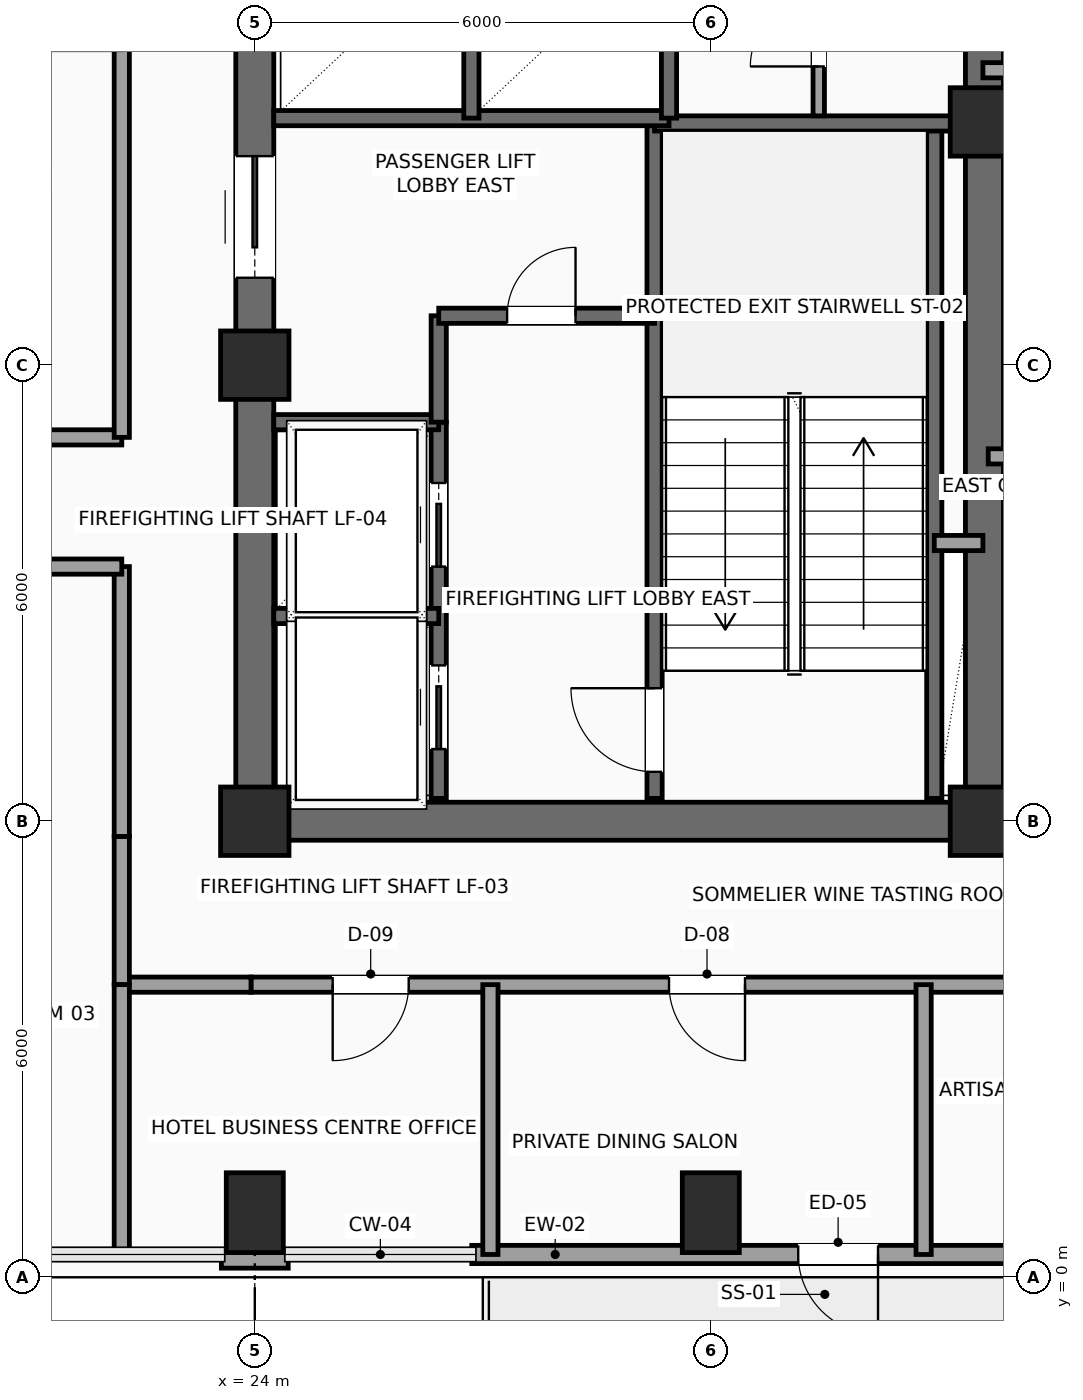
"""IFC4 building model, lengths in metres.
Left out: names, types, materials, properties, quantities, classifications, styles, units other than length and angle.
Written with IfcOpenShell. Run it as: python <this file> out.ifc"""

import sys

from ifc_helpers import new_model, si_unit, direction, frame, frame_2d, origin, origin_2d, place, context, subcontext, project, spatial, rectangle, extrude, element, fill, save


model = new_model("IFC4")
c1 = context("Model", 3, precision=1e-05, world=origin(), true_north=direction((0.0, 1.0)))
c2 = subcontext(c1, "Body", "Model", "MODEL_VIEW")
j1 = project(units=[si_unit("LENGTHUNIT", "METRE"), si_unit("PLANEANGLEUNIT", "RADIAN")], contexts=[c1])
p1 = place(None, origin())
s1 = spatial("IfcSite", under=j1, at=p1, CompositionType="ELEMENT")
p2 = place(p1, origin())
s2 = spatial("IfcBuilding", under=s1, at=p2, CompositionType="ELEMENT")
p3 = place(p2, frame((0.0, 0.0, 169.2)))
s3 = spatial("IfcBuildingStorey", under=s2, at=p3, CompositionType="ELEMENT", Elevation=169.2)
for number, where, z_axis, x_axis in (
    (1, (24.0, 6.0, 0.0), (0.0, 0.0, 1.0), (1.0, 0.0, 0.0)),
    (2, (24.0, 12.0, 0.0), (0.0, 0.0, 1.0), (1.0, 0.0, 0.0)),
    (3, (33.6, 6.0, 0.0), (0.0, 0.0, 1.0), (1.0, 0.0, 0.0)),
    (4, (33.6, 15.2, 0.0), (0.0, 0.0, 1.0), (1.0, 0.0, 0.0)),
):
    element("IfcColumn", number, at=place(p3, frame(where, z_axis=z_axis, x_axis=x_axis)), inside=s3, PredefinedType="COLUMN", context=c2, shape_type="SweptSolid", body=[
        extrude(rectangle(XDim=0.9, YDim=0.9, at=origin_2d()), origin(), (0.0, 0.0, 1.0), 3.75),
    ])
for number, where, z_axis, x_axis in (
    (5, (24.0, 0.85, 0.0), (0.0, 0.0, 1.0), (1.0, 0.0, 0.0)),
    (6, (30.0, 0.85, 0.0), (0.0, 0.0, 1.0), (1.0, 0.0, 0.0)),
):
    element("IfcColumn", number, at=place(p3, frame(where, z_axis=z_axis, x_axis=x_axis)), inside=s3, PredefinedType="COLUMN", context=c2, shape_type="SweptSolid", body=[
        extrude(rectangle(XDim=0.75, YDim=1.05, at=origin_2d()), origin(), (0.0, 0.0, 1.0), 3.75),
    ])
p4 = place(p3, frame((36.145, 0.3, 0.0), z_axis=(0.0, 0.0, 1.0), x_axis=(-1.0, 0.0, 0.0)))
e7 = element("IfcWall", 7, at=p4, inside=s3, PredefinedType="SOLIDWALL", context=c2, shape_type="SweptSolid", body=[
    extrude(rectangle(XDim=9.29, YDim=0.24, at=frame_2d((4.645, 0.0))), origin(), (0.0, 0.0, 1.0), 3.54),
])
p5 = place(p4, frame((3.945, 0.0, 0.0)))
e8 = element("IfcOpeningElement", 8, at=p5, cuts=e7, PredefinedType="OPENING", context=c2, shape_type="SweptSolid", body=[
    extrude(rectangle(XDim=1.05, YDim=2.2, at=frame_2d((0.525, 1.1))), frame((0.0, 0.13, 0.0), z_axis=(0.0, -1.0, 0.0), x_axis=(1.0, 0.0, 0.0)), (0.0, 0.0, 1.0), 0.26),
])
p6 = place(p3, frame((24.44, 0.24, 0.0), z_axis=(0.0, 0.0, 1.0), x_axis=(-1.0, 0.0, 0.0)))
e9 = element("IfcWall", 9, at=p6, inside=s3, PredefinedType="SOLIDWALL", context=c2, shape_type="SweptSolid", body=[
    extrude(rectangle(XDim=0.88, YDim=0.24, at=frame_2d((0.44, 0.0))), origin(), (0.0, 0.0, 1.0), 3.54),
])
p7 = place(p3, frame((24.0, 6.0, 0.0), z_axis=(0.0, 0.0, 1.0), x_axis=(1.0, 0.0, 0.0)))
e10 = element("IfcWall", 10, at=p7, inside=s3, PredefinedType="SHEAR", context=c2, shape_type="SweptSolid", body=[
    extrude(rectangle(XDim=9.6, YDim=0.5, at=frame_2d((4.8, 0.0))), origin(), (0.0, 0.0, 1.0), 3.54),
])
p8 = place(p3, frame((24.0, 6.0, 0.0), z_axis=(0.0, 0.0, 1.0), x_axis=(0.0, 1.0, 0.0)))
e11 = element("IfcWall", 11, at=p8, inside=s3, PredefinedType="SHEAR", context=c2, shape_type="SweptSolid", body=[
    extrude(rectangle(XDim=12.0, YDim=0.5, at=frame_2d((6.0, 0.0))), origin(), (0.0, 0.0, 1.0), 3.54),
])
p9 = place(p8, frame((7.15, 0.0, 0.0)))
e12 = element("IfcOpeningElement", 12, at=p9, cuts=e11, PredefinedType="OPENING", context=c2, shape_type="SweptSolid", body=[
    extrude(rectangle(XDim=1.6, YDim=2.3, at=frame_2d((0.8, 1.15))), frame((0.0, 0.26, 0.0), z_axis=(0.0, -1.0, 0.0), x_axis=(1.0, 0.0, 0.0)), (0.0, 0.0, 1.0), 0.52),
])
p10 = place(p3, frame((33.6, 6.0, 0.0), z_axis=(0.0, 0.0, 1.0), x_axis=(0.0, 1.0, 0.0)))
e13 = element("IfcWall", 13, at=p10, inside=s3, PredefinedType="SHEAR", context=c2, shape_type="SweptSolid", body=[
    extrude(rectangle(XDim=12.0, YDim=0.5, at=frame_2d((6.0, 0.0))), origin(), (0.0, 0.0, 1.0), 3.54),
])
p11 = place(p10, frame((10.15, 0.0, 0.0)))
e14 = element("IfcOpeningElement", 14, at=p11, cuts=e13, PredefinedType="OPENING", context=c2, shape_type="SweptSolid", body=[
    extrude(rectangle(XDim=0.9, YDim=2.15, at=frame_2d((0.45, 1.075))), frame((0.0, 0.26, 0.0), z_axis=(0.0, -1.0, 0.0), x_axis=(1.0, 0.0, 0.0)), (0.0, 0.0, 1.0), 0.52),
])
p12 = place(p3, frame((29.26, 6.3, 0.0), z_axis=(0.0, 0.0, 1.0), x_axis=(0.0, 1.0, 0.0)))
e15 = element("IfcWall", 15, at=p12, inside=s3, PredefinedType="SHEAR", context=c2, shape_type="SweptSolid", body=[
    extrude(rectangle(XDim=8.88, YDim=0.2, at=frame_2d((4.44, 0.0))), origin(), (0.0, 0.0, 1.0), 3.54),
])
p13 = place(p12, frame((0.35, 0.0, 0.0)))
e16 = element("IfcOpeningElement", 16, at=p13, cuts=e15, PredefinedType="OPENING", context=c2, shape_type="SweptSolid", body=[
    extrude(rectangle(XDim=1.1, YDim=2.2, at=frame_2d((0.55, 1.1))), frame((0.0, 0.11, 0.0), z_axis=(0.0, -1.0, 0.0), x_axis=(1.0, 0.0, 0.0)), (0.0, 0.0, 1.0), 0.22),
])
p14 = place(p3, frame((32.94, 6.3, 0.0), z_axis=(0.0, 0.0, 1.0), x_axis=(0.0, 1.0, 0.0)))
e17 = element("IfcWall", 17, at=p14, inside=s3, PredefinedType="SHEAR", context=c2, shape_type="SweptSolid", body=[
    extrude(rectangle(XDim=8.88, YDim=0.2, at=frame_2d((4.44, 0.0))), origin(), (0.0, 0.0, 1.0), 3.54),
])
p15 = place(p3, frame((29.26, 15.18, 0.0), z_axis=(0.0, 0.0, 1.0), x_axis=(1.0, 0.0, 0.0)))
e18 = element("IfcWall", 18, at=p15, inside=s3, PredefinedType="SHEAR", context=c2, shape_type="SweptSolid", body=[
    extrude(rectangle(XDim=4.04, YDim=0.2, at=frame_2d((2.02, 0.0))), origin(), (0.0, 0.0, 1.0), 3.54),
])
p16 = place(p3, frame((26.42, 6.3, 0.0), z_axis=(0.0, 0.0, 1.0), x_axis=(0.0, 1.0, 0.0)))
e19 = element("IfcWall", 19, at=p16, inside=s3, PredefinedType="SHEAR", context=c2, shape_type="SweptSolid", body=[
    extrude(rectangle(XDim=4.95, YDim=0.2, at=frame_2d((2.475, 0.0))), origin(), (0.0, 0.0, 1.0), 3.54),
])
p17 = place(p16, frame((0.65, 0.0, 0.0)))
e20 = element("IfcOpeningElement", 20, at=p17, cuts=e19, PredefinedType="OPENING", context=c2, shape_type="SweptSolid", body=[
    extrude(rectangle(XDim=1.1, YDim=2.2, at=frame_2d((0.55, 1.1))), frame((0.0, 0.11, 0.0), z_axis=(0.0, -1.0, 0.0), x_axis=(1.0, 0.0, 0.0)), (0.0, 0.0, 1.0), 0.22),
])
p18 = place(p16, frame((3.05, 0.0, 0.0)))
e21 = element("IfcOpeningElement", 21, at=p18, cuts=e19, PredefinedType="OPENING", context=c2, shape_type="SweptSolid", body=[
    extrude(rectangle(XDim=1.1, YDim=2.2, at=frame_2d((0.55, 1.1))), frame((0.0, 0.11, 0.0), z_axis=(0.0, -1.0, 0.0), x_axis=(1.0, 0.0, 0.0)), (0.0, 0.0, 1.0), 0.22),
])
for number, where, z_axis, x_axis in (
    (22, (24.25, 8.7, 0.0), (0.0, 0.0, 1.0), (1.0, 0.0, 0.0)),
    (23, (24.25, 11.25, 0.0), (0.0, 0.0, 1.0), (1.0, 0.0, 0.0)),
):
    element("IfcWall", number, at=place(p3, frame(where, z_axis=z_axis, x_axis=x_axis)), inside=s3, PredefinedType="SHEAR", context=c2, shape_type="SweptSolid", body=[
        extrude(rectangle(XDim=2.17, YDim=0.2, at=frame_2d((1.085, 0.0))), origin(), (0.0, 0.0, 1.0), 3.54),
    ])
p19 = place(p3, frame((26.42, 11.25, 0.0), z_axis=(0.0, 0.0, 1.0), x_axis=(0.0, 1.0, 0.0)))
e24 = element("IfcWall", 24, at=p19, inside=s3, PredefinedType="SHEAR", context=c2, shape_type="SweptSolid", body=[
    extrude(rectangle(XDim=1.4, YDim=0.2, at=frame_2d((0.7, 0.0))), origin(), (0.0, 0.0, 1.0), 3.54),
])
p20 = place(p3, frame((26.42, 12.65, 0.0), z_axis=(0.0, 0.0, 1.0), x_axis=(1.0, 0.0, 0.0)))
e25 = element("IfcWall", 25, at=p20, inside=s3, PredefinedType="SHEAR", context=c2, shape_type="SweptSolid", body=[
    extrude(rectangle(XDim=2.84, YDim=0.2, at=frame_2d((1.42, 0.0))), origin(), (0.0, 0.0, 1.0), 3.54),
])
p21 = place(p20, frame((0.9, 0.0, 0.0)))
e26 = element("IfcOpeningElement", 26, at=p21, cuts=e25, PredefinedType="OPENING", context=c2, shape_type="SweptSolid", body=[
    extrude(rectangle(XDim=0.9, YDim=2.15, at=frame_2d((0.45, 1.075))), frame((0.0, 0.11, 0.0), z_axis=(0.0, -1.0, 0.0), x_axis=(1.0, 0.0, 0.0)), (0.0, 0.0, 1.0), 0.22),
])
p22 = place(p3, frame((32.94, 9.66, 0.0), z_axis=(0.0, 0.0, 1.0), x_axis=(1.0, 0.0, 0.0)))
e27 = element("IfcWall", 27, at=p22, inside=s3, PredefinedType="SOLIDWALL", context=c2, shape_type="SweptSolid", body=[
    extrude(rectangle(XDim=0.64, YDim=0.2, at=frame_2d((0.32, 0.0))), origin(), (0.0, 0.0, 1.0), 3.54),
])
p23 = place(p3, frame((24.25, 15.25, 0.0), z_axis=(0.0, 0.0, 1.0), x_axis=(1.0, 0.0, 0.0)))
e28 = element("IfcWall", 28, at=p23, inside=s3, PredefinedType="SHEAR", context=c2, shape_type="SweptSolid", body=[
    extrude(rectangle(XDim=5.2, YDim=0.2, at=frame_2d((2.6, 0.0))), origin(), (0.0, 0.0, 1.0), 3.54),
])
p24 = place(p3, frame((26.85, 15.25, 0.0), z_axis=(0.0, 0.0, 1.0), x_axis=(0.0, 1.0, 0.0)))
e29 = element("IfcWall", 29, at=p24, inside=s3, PredefinedType="SHEAR", context=c2, shape_type="SweptSolid", body=[
    extrude(rectangle(XDim=2.4, YDim=0.2, at=frame_2d((1.2, 0.0))), origin(), (0.0, 0.0, 1.0), 3.54),
])
p25 = place(p3, frame((29.45, 15.25, 0.0), z_axis=(0.0, 0.0, 1.0), x_axis=(0.0, 1.0, 0.0)))
e30 = element("IfcWall", 30, at=p25, inside=s3, PredefinedType="SHEAR", context=c2, shape_type="SweptSolid", body=[
    extrude(rectangle(XDim=2.45, YDim=0.2, at=frame_2d((1.225, 0.0))), origin(), (0.0, 0.0, 1.0), 3.54),
])
p26 = place(p3, frame((31.42, 15.28, 0.0), z_axis=(0.0, 0.0, 1.0), x_axis=(0.0, 1.0, 0.0)))
e31 = element("IfcWall", 31, at=p26, inside=s3, PredefinedType="PARTITIONING", context=c2, shape_type="SweptSolid", body=[
    extrude(rectangle(XDim=2.42, YDim=0.15, at=frame_2d((1.21, 0.0))), origin(), (0.0, 0.0, 1.0), 3.54),
])
p27 = place(p26, frame((0.65, 0.0, 0.0)))
e32 = element("IfcOpeningElement", 32, at=p27, cuts=e31, PredefinedType="OPENING", context=c2, shape_type="SweptSolid", body=[
    extrude(rectangle(XDim=0.9, YDim=2.15, at=frame_2d((0.45, 1.075))), frame((0.0, 0.085, 0.0), z_axis=(0.0, -1.0, 0.0), x_axis=(1.0, 0.0, 0.0)), (0.0, 0.0, 1.0), 0.17),
])
p28 = place(p3, frame((36.35, 15.88, 0.0), z_axis=(0.0, 0.0, 1.0), x_axis=(-1.0, 0.0, 0.0)))
e33 = element("IfcWall", 33, at=p28, inside=s3, PredefinedType="PARTITIONING", context=c2, shape_type="SweptSolid", body=[
    extrude(rectangle(XDim=2.77, YDim=0.2, at=frame_2d((1.385, 0.0))), origin(), (0.0, 0.0, 1.0), 3.54),
])
p29 = place(p3, frame((36.35, 3.85, 0.0), z_axis=(0.0, 0.0, 1.0), x_axis=(-1.0, 0.0, 0.0)))
e34 = element("IfcWall", 34, at=p29, inside=s3, PredefinedType="PARTITIONING", context=c2, shape_type="SweptSolid", body=[
    extrude(rectangle(XDim=12.4, YDim=0.2, at=frame_2d((6.2, 0.0))), origin(), (0.0, 0.0, 1.0), 3.54),
])
p30 = place(p29, frame((10.325, 0.0, 0.0)))
e35 = element("IfcOpeningElement", 35, at=p30, cuts=e34, PredefinedType="OPENING", context=c2, shape_type="SweptSolid", body=[
    extrude(rectangle(XDim=1.0, YDim=2.2, at=frame_2d((0.5, 1.1))), frame((0.0, 0.11, 0.0), z_axis=(0.0, -1.0, 0.0), x_axis=(1.0, 0.0, 0.0)), (0.0, 0.0, 1.0), 0.22),
])
p31 = place(p29, frame((5.9, 0.0, 0.0)))
e36 = element("IfcOpeningElement", 36, at=p31, cuts=e34, PredefinedType="OPENING", context=c2, shape_type="SweptSolid", body=[
    extrude(rectangle(XDim=1.0, YDim=2.2, at=frame_2d((0.5, 1.1))), frame((0.0, 0.11, 0.0), z_axis=(0.0, -1.0, 0.0), x_axis=(1.0, 0.0, 0.0)), (0.0, 0.0, 1.0), 0.22),
])
p32 = place(p3, frame((23.95, 3.85, 0.0), z_axis=(0.0, 0.0, 1.0), x_axis=(-1.0, 0.0, 0.0)))
e37 = element("IfcWall", 37, at=p32, inside=s3, PredefinedType="PARTITIONING", context=c2, shape_type="SweptSolid", body=[
    extrude(rectangle(XDim=1.7, YDim=0.2, at=frame_2d((0.85, 0.0))), origin(), (0.0, 0.0, 1.0), 3.54),
])
p33 = place(p3, frame((22.25, 3.85, 0.0), z_axis=(0.0, 0.0, 1.0), x_axis=(0.0, 1.0, 0.0)))
e38 = element("IfcWall", 38, at=p33, inside=s3, PredefinedType="PARTITIONING", context=c2, shape_type="SweptSolid", body=[
    extrude(rectangle(XDim=1.95, YDim=0.2, at=frame_2d((0.975, 0.0))), origin(), (0.0, 0.0, 1.0), 3.54),
])
p34 = place(p3, frame((22.25, 5.8, 0.0), z_axis=(0.0, 0.0, 1.0), x_axis=(0.0, 1.0, 0.0)))
e39 = element("IfcWall", 39, at=p34, inside=s3, PredefinedType="PARTITIONING", context=c2, shape_type="SweptSolid", body=[
    extrude(rectangle(XDim=3.55, YDim=0.2, at=frame_2d((1.775, 0.0))), origin(), (0.0, 0.0, 1.0), 3.54),
])
p35 = place(p3, frame((22.25, 9.35, 0.0), z_axis=(0.0, 0.0, 1.0), x_axis=(-1.0, 0.0, 0.0)))
e40 = element("IfcWall", 40, at=p35, inside=s3, PredefinedType="PARTITIONING", context=c2, shape_type="SweptSolid", body=[
    extrude(rectangle(XDim=15.85, YDim=0.2, at=frame_2d((7.925, 0.0))), origin(), (0.0, 0.0, 1.0), 3.54),
])
p36 = place(p35, frame((14.19, 0.0, 0.0)))
e41 = element("IfcOpeningElement", 41, at=p36, cuts=e40, PredefinedType="OPENING", context=c2, shape_type="SweptSolid", body=[
    extrude(rectangle(XDim=1.0, YDim=2.2, at=frame_2d((0.5, 1.1))), frame((0.0, 0.11, 0.0), z_axis=(0.0, -1.0, 0.0), x_axis=(1.0, 0.0, 0.0)), (0.0, 0.0, 1.0), 0.22),
])
p37 = place(p35, frame((8.265, 0.0, 0.0)))
e42 = element("IfcOpeningElement", 42, at=p37, cuts=e40, PredefinedType="OPENING", context=c2, shape_type="SweptSolid", body=[
    extrude(rectangle(XDim=1.0, YDim=2.2, at=frame_2d((0.5, 1.1))), frame((0.0, 0.11, 0.0), z_axis=(0.0, -1.0, 0.0), x_axis=(1.0, 0.0, 0.0)), (0.0, 0.0, 1.0), 0.22),
])
p38 = place(p35, frame((1.54, 0.0, 0.0)))
e43 = element("IfcOpeningElement", 43, at=p38, cuts=e40, PredefinedType="OPENING", context=c2, shape_type="SweptSolid", body=[
    extrude(rectangle(XDim=1.0, YDim=2.2, at=frame_2d((0.5, 1.1))), frame((0.0, 0.11, 0.0), z_axis=(0.0, -1.0, 0.0), x_axis=(1.0, 0.0, 0.0)), (0.0, 0.0, 1.0), 0.22),
])
p39 = place(p3, frame((10.45, 11.05, 0.0), z_axis=(0.0, 0.0, 1.0), x_axis=(1.0, 0.0, 0.0)))
e44 = element("IfcWall", 44, at=p39, inside=s3, PredefinedType="PARTITIONING", context=c2, shape_type="SweptSolid", body=[
    extrude(rectangle(XDim=11.8, YDim=0.2, at=frame_2d((5.9, 0.0))), origin(), (0.0, 0.0, 1.0), 3.54),
])
p40 = place(p39, frame((2.33, 0.0, 0.0)))
e45 = element("IfcOpeningElement", 45, at=p40, cuts=e44, PredefinedType="OPENING", context=c2, shape_type="SweptSolid", body=[
    extrude(rectangle(XDim=1.0, YDim=2.2, at=frame_2d((0.5, 1.1))), frame((0.0, 0.11, 0.0), z_axis=(0.0, -1.0, 0.0), x_axis=(1.0, 0.0, 0.0)), (0.0, 0.0, 1.0), 0.22),
])
p41 = place(p39, frame((5.3, 0.0, 0.0)))
e46 = element("IfcOpeningElement", 46, at=p41, cuts=e44, PredefinedType="OPENING", context=c2, shape_type="SweptSolid", body=[
    extrude(rectangle(XDim=0.9, YDim=2.1, at=frame_2d((0.45, 1.05))), frame((0.0, 0.11, 0.0), z_axis=(0.0, -1.0, 0.0), x_axis=(1.0, 0.0, 0.0)), (0.0, 0.0, 1.0), 0.22),
])
p42 = place(p39, frame((9.225, 0.0, 0.0)))
e47 = element("IfcOpeningElement", 47, at=p42, cuts=e44, PredefinedType="OPENING", context=c2, shape_type="SweptSolid", body=[
    extrude(rectangle(XDim=0.9, YDim=2.1, at=frame_2d((0.45, 1.05))), frame((0.0, 0.11, 0.0), z_axis=(0.0, -1.0, 0.0), x_axis=(1.0, 0.0, 0.0)), (0.0, 0.0, 1.0), 0.22),
])
p43 = place(p3, frame((22.25, 11.05, 0.0), z_axis=(0.0, 0.0, 1.0), x_axis=(0.0, 1.0, 0.0)))
e48 = element("IfcWall", 48, at=p43, inside=s3, PredefinedType="PARTITIONING", context=c2, shape_type="SweptSolid", body=[
    extrude(rectangle(XDim=19.2, YDim=0.2, at=frame_2d((9.6, 0.0))), origin(), (0.0, 0.0, 1.0), 3.54),
])
for number, where, z_axis, x_axis in (
    (49, (22.25, 0.3, 0.0), (0.0, 0.0, 1.0), (0.0, 1.0, 0.0)),
    (50, (27.1, 0.3, 0.0), (0.0, 0.0, 1.0), (0.0, 1.0, 0.0)),
    (51, (32.8, 0.3, 0.0), (0.0, 0.0, 1.0), (0.0, 1.0, 0.0)),
):
    element("IfcWall", number, at=place(p3, frame(where, z_axis=z_axis, x_axis=x_axis)), inside=s3, PredefinedType="PARTITIONING", context=c2, shape_type="SweptSolid", body=[
        extrude(rectangle(XDim=3.55, YDim=0.2, at=frame_2d((1.775, 0.0))), origin(), (0.0, 0.0, 1.0), 3.54),
    ])
p44 = place(p3, frame((33.65, 5.8, 0.0), z_axis=(0.0, 0.0, 1.0), x_axis=(1.0, 0.0, 0.0)))
e52 = element("IfcWall", 52, at=p44, inside=s3, PredefinedType="PARTITIONING", context=c2, shape_type="SweptSolid", body=[
    extrude(rectangle(XDim=2.7, YDim=0.2, at=frame_2d((1.35, 0.0))), origin(), (0.0, 0.0, 1.0), 3.132),
])
p45 = place(p3, frame((33.65, 10.8, 0.0), z_axis=(0.0, 0.0, 1.0), x_axis=(1.0, 0.0, 0.0)))
e53 = element("IfcWall", 53, at=p45, inside=s3, PredefinedType="PARTITIONING", context=c2, shape_type="SweptSolid", body=[
    extrude(rectangle(XDim=2.7, YDim=0.2, at=frame_2d((1.35, 0.0))), origin(), (0.0, 0.0, 1.0), 3.54),
])
p46 = place(p5, origin())
e54 = element("IfcDoor", 54, at=p46, inside=s3, OperationType="SINGLE_SWING_LEFT", PredefinedType="DOOR", context=c2, shape_type="SweptSolid", body=[
    extrude(rectangle(XDim=1.05, YDim=2.2, at=frame_2d((0.525, 1.1))), frame((0.0, 0.025, 0.0), z_axis=(0.0, -1.0, 0.0), x_axis=(1.0, 0.0, 0.0)), (0.0, 0.0, 1.0), 0.05),
])
fill(e8, e54)
p47 = place(p9, origin())
e55 = element("IfcDoor", 55, at=p47, inside=s3, OperationType="DOUBLE_DOOR_SLIDING", PredefinedType="DOOR", context=c2, shape_type="SweptSolid", body=[
    extrude(rectangle(XDim=1.6, YDim=2.3, at=frame_2d((0.8, 1.15))), frame((0.0, 0.025, 0.0), z_axis=(0.0, -1.0, 0.0), x_axis=(1.0, 0.0, 0.0)), (0.0, 0.0, 1.0), 0.05),
])
fill(e12, e55)
p48 = place(p13, origin())
e56 = element("IfcDoor", 56, at=p48, inside=s3, OperationType="SINGLE_SWING_RIGHT", PredefinedType="DOOR", context=c2, shape_type="SweptSolid", body=[
    extrude(rectangle(XDim=1.1, YDim=2.2, at=frame_2d((0.55, 1.1))), frame((0.0, 0.025, 0.0), z_axis=(0.0, -1.0, 0.0), x_axis=(1.0, 0.0, 0.0)), (0.0, 0.0, 1.0), 0.05),
])
fill(e16, e56)
p49 = place(p17, origin())
e57 = element("IfcDoor", 57, at=p49, inside=s3, OperationType="SLIDING_TO_LEFT", PredefinedType="DOOR", context=c2, shape_type="SweptSolid", body=[
    extrude(rectangle(XDim=1.1, YDim=2.2, at=frame_2d((0.55, 1.1))), frame((0.0, 0.025, 0.0), z_axis=(0.0, -1.0, 0.0), x_axis=(1.0, 0.0, 0.0)), (0.0, 0.0, 1.0), 0.05),
])
fill(e20, e57)
p50 = place(p18, origin())
e58 = element("IfcDoor", 58, at=p50, inside=s3, OperationType="SLIDING_TO_LEFT", PredefinedType="DOOR", context=c2, shape_type="SweptSolid", body=[
    extrude(rectangle(XDim=1.1, YDim=2.2, at=frame_2d((0.55, 1.1))), frame((0.0, 0.025, 0.0), z_axis=(0.0, -1.0, 0.0), x_axis=(1.0, 0.0, 0.0)), (0.0, 0.0, 1.0), 0.05),
])
fill(e21, e58)
p51 = place(p21, origin())
e59 = element("IfcDoor", 59, at=p51, inside=s3, OperationType="SINGLE_SWING_RIGHT", PredefinedType="DOOR", context=c2, shape_type="SweptSolid", body=[
    extrude(rectangle(XDim=0.9, YDim=2.15, at=frame_2d((0.45, 1.075))), frame((0.0, 0.025, 0.0), z_axis=(0.0, -1.0, 0.0), x_axis=(1.0, 0.0, 0.0)), (0.0, 0.0, 1.0), 0.05),
])
fill(e26, e59)
p52 = place(p27, origin())
e60 = element("IfcDoor", 60, at=p52, inside=s3, OperationType="SINGLE_SWING_LEFT", PredefinedType="DOOR", context=c2, shape_type="SweptSolid", body=[
    extrude(rectangle(XDim=0.9, YDim=2.15, at=frame_2d((0.45, 1.075))), frame((0.0, 0.025, 0.0), z_axis=(0.0, -1.0, 0.0), x_axis=(1.0, 0.0, 0.0)), (0.0, 0.0, 1.0), 0.05),
])
fill(e32, e60)
p53 = place(p30, origin())
e61 = element("IfcDoor", 61, at=p53, inside=s3, OperationType="SINGLE_SWING_RIGHT", PredefinedType="DOOR", context=c2, shape_type="SweptSolid", body=[
    extrude(rectangle(XDim=1.0, YDim=2.2, at=frame_2d((0.5, 1.1))), frame((0.0, 0.025, 0.0), z_axis=(0.0, -1.0, 0.0), x_axis=(1.0, 0.0, 0.0)), (0.0, 0.0, 1.0), 0.05),
])
fill(e35, e61)
p54 = place(p31, origin())
e62 = element("IfcDoor", 62, at=p54, inside=s3, OperationType="SINGLE_SWING_LEFT", PredefinedType="DOOR", context=c2, shape_type="SweptSolid", body=[
    extrude(rectangle(XDim=1.0, YDim=2.2, at=frame_2d((0.5, 1.1))), frame((0.0, 0.025, 0.0), z_axis=(0.0, -1.0, 0.0), x_axis=(1.0, 0.0, 0.0)), (0.0, 0.0, 1.0), 0.05),
])
fill(e36, e62)
save(model, sys.argv[1])
